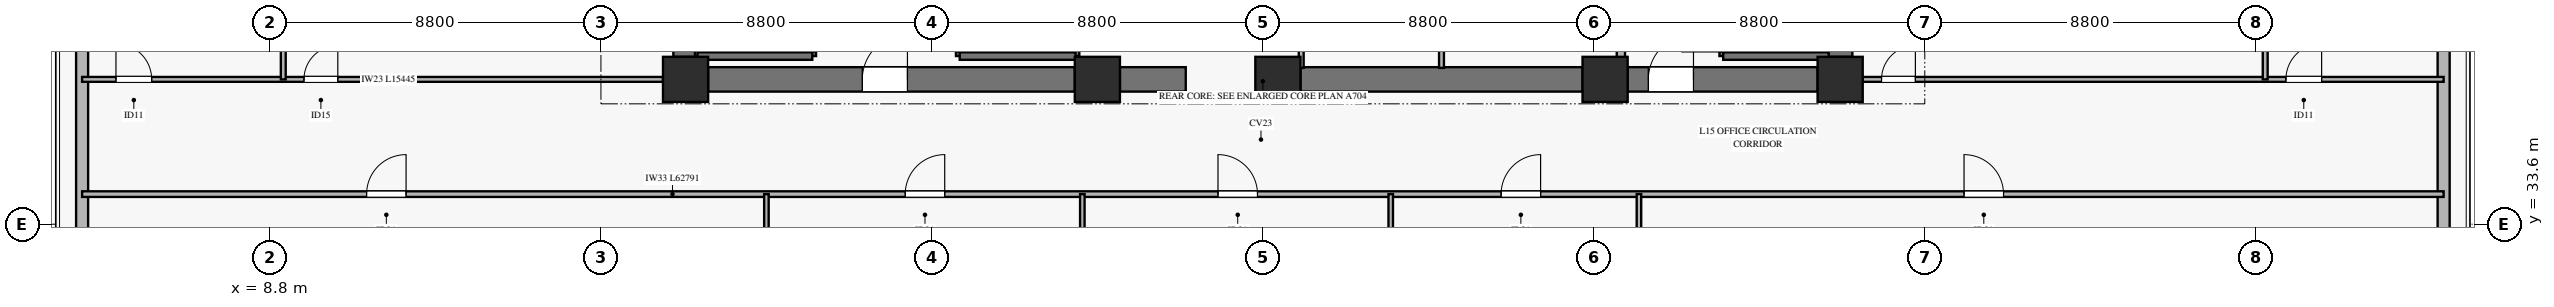
"""IFC4 building model, lengths in metres.
Left out: names, types, materials, properties, quantities, classifications, styles, units other than length and angle.
Written with IfcOpenShell. Run it as: python <this file> out.ifc"""

import sys

from ifc_helpers import new_model, si_unit, direction, frame, frame_2d, origin, origin_2d, place, context, subcontext, project, spatial, rectangle, extrude, source, transform, mapped, element, fill, save


model = new_model("IFC4")
c1 = context("Model", 3, precision=1e-05, world=origin(), true_north=direction((0.0, 1.0)))
c2 = subcontext(c1, "Body", "Model", "MODEL_VIEW")
j1 = project(units=[si_unit("LENGTHUNIT", "METRE"), si_unit("PLANEANGLEUNIT", "RADIAN")], contexts=[c1])
p1 = place(None, origin())
s1 = spatial("IfcSite", under=j1, at=p1, CompositionType="ELEMENT")
p2 = place(p1, origin())
s2 = spatial("IfcBuilding", under=s1, at=p2, CompositionType="ELEMENT")
p3 = place(p2, frame((0.0, 0.0, 61.1)))
s3 = spatial("IfcBuildingStorey", under=s2, at=p3, CompositionType="ELEMENT", Elevation=61.1)
m1 = source(origin(), c2, "Body", "SweptSolid", [
    extrude(rectangle(XDim=1.2, YDim=1.2, at=origin_2d()), origin(), (0.0, 0.0, 1.0), 3.68),
])
for number, where, z_axis, x_axis in (
    (1, (19.85, 37.45, 0.0), (0.0, 0.0, 1.0), (1.0, 0.0, 0.0)),
    (2, (30.8, 37.45, 0.0), (0.0, 0.0, 1.0), (1.0, 0.0, 0.0)),
    (3, (35.6, 37.45, 0.0), (0.0, 0.0, 1.0), (1.0, 0.0, 0.0)),
    (4, (44.3, 37.45, 0.0), (0.0, 0.0, 1.0), (1.0, 0.0, 0.0)),
    (5, (50.55, 37.45, 0.0), (0.0, 0.0, 1.0), (1.0, 0.0, 0.0)),
):
    element("IfcColumn", number, at=place(p3, frame(where, z_axis=z_axis, x_axis=x_axis)), inside=s3, PredefinedType="PILASTER", context=c2, shape_type="MappedRepresentation", body=[
        mapped(m1, transform((0.0, 0.0, 0.0), x_axis=(1.0, 0.0, 0.0), y_axis=(0.0, 1.0, 0.0), z_axis=(0.0, 0.0, 1.0), scale=1.0)),
    ])
p4 = place(p3, frame((20.45, 37.45, 0.0), z_axis=(0.0, 0.0, 1.0), x_axis=(1.0, 0.0, 0.0)))
e6 = element("IfcWall", 6, at=p4, inside=s3, PredefinedType="SHEAR", context=c2, shape_type="SweptSolid", body=[
    extrude(rectangle(XDim=9.75, YDim=0.65, at=frame_2d((4.875, 0.0))), origin(), (0.0, 0.0, 1.0), 3.68),
])
p5 = place(p4, frame((4.1, 0.0, 0.0)))
e7 = element("IfcOpeningElement", 7, at=p5, cuts=e6, PredefinedType="OPENING", context=c2, shape_type="SweptSolid", body=[
    extrude(rectangle(XDim=1.2, YDim=2.15, at=frame_2d((0.6, 1.075))), frame((0.0, 0.335, 0.0), z_axis=(0.0, -1.0, 0.0), x_axis=(1.0, 0.0, 0.0)), (0.0, 0.0, 1.0), 0.67),
])
p6 = place(p3, frame((31.4, 37.45, 0.0), z_axis=(0.0, 0.0, 1.0), x_axis=(1.0, 0.0, 0.0)))
e8 = element("IfcWall", 8, at=p6, inside=s3, PredefinedType="SHEAR", context=c2, shape_type="SweptSolid", body=[
    extrude(rectangle(XDim=1.75, YDim=0.65, at=frame_2d((0.875, 0.0))), origin(), (0.0, 0.0, 1.0), 3.68),
])
p7 = place(p3, frame((36.2, 37.45, 0.0), z_axis=(0.0, 0.0, 1.0), x_axis=(1.0, 0.0, 0.0)))
e9 = element("IfcWall", 9, at=p7, inside=s3, PredefinedType="SHEAR", context=c2, shape_type="SweptSolid", body=[
    extrude(rectangle(XDim=7.5, YDim=0.65, at=frame_2d((3.75, 0.0))), origin(), (0.0, 0.0, 1.0), 3.68),
])
p8 = place(p3, frame((44.9, 37.45, 0.0), z_axis=(0.0, 0.0, 1.0), x_axis=(1.0, 0.0, 0.0)))
e10 = element("IfcWall", 10, at=p8, inside=s3, PredefinedType="SHEAR", context=c2, shape_type="SweptSolid", body=[
    extrude(rectangle(XDim=5.05, YDim=0.65, at=frame_2d((2.525, 0.0))), origin(), (0.0, 0.0, 1.0), 3.68),
])
p9 = place(p8, frame((0.55, 0.0, 0.0)))
e11 = element("IfcOpeningElement", 11, at=p9, cuts=e10, PredefinedType="OPENING", context=c2, shape_type="SweptSolid", body=[
    extrude(rectangle(XDim=1.2, YDim=2.15, at=frame_2d((0.6, 1.075))), frame((0.0, 0.335, 0.0), z_axis=(0.0, -1.0, 0.0), x_axis=(1.0, 0.0, 0.0)), (0.0, 0.0, 1.0), 0.67),
])
for number, where, z_axis, x_axis in (
    (12, (19.85, 38.05, 0.0), (0.0, 0.0, 1.0), (0.0, 1.0, 0.0)),
    (13, (50.55, 38.05, 0.0), (0.0, 0.0, 1.0), (0.0, 1.0, 0.0)),
):
    element("IfcWall", number, at=place(p3, frame(where, z_axis=z_axis, x_axis=x_axis)), inside=s3, PredefinedType="SHEAR", context=c2, shape_type="SweptSolid", body=[
        extrude(rectangle(XDim=7.9, YDim=0.65, at=frame_2d((3.95, 0.0))), origin(), (0.0, 0.0, 1.0), 3.68),
    ])
p10 = place(p3, frame((3.805, 25.991, 0.0), z_axis=(0.0, 0.0, 1.0), x_axis=(0.0, 1.0, 0.0)))
e14 = element("IfcWall", 14, at=p10, inside=s3, PredefinedType="SOLIDWALL", context=c2, shape_type="SweptSolid", body=[
    extrude(rectangle(XDim=16.987, YDim=0.32, at=frame_2d((8.494, 0.0))), origin(), (0.0, 0.0, 1.0), 3.16),
])
p11 = place(p10, frame((4.223, 0.0, 0.45)))
e15 = element("IfcOpeningElement", 15, at=p11, cuts=e14, PredefinedType="OPENING", context=c2, shape_type="SweptSolid", body=[
    extrude(rectangle(XDim=2.4, YDim=2.1, at=frame_2d((1.2, 1.05))), frame((0.0, 0.17, 0.0), z_axis=(0.0, -1.0, 0.0), x_axis=(1.0, 0.0, 0.0)), (0.0, 0.0, 1.0), 0.34),
])
p12 = place(p3, frame((66.596, 25.991, 0.0), z_axis=(0.0, 0.0, 1.0), x_axis=(0.0, 1.0, 0.0)))
e16 = element("IfcWall", 16, at=p12, inside=s3, PredefinedType="SOLIDWALL", context=c2, shape_type="SweptSolid", body=[
    extrude(rectangle(XDim=16.987, YDim=0.32, at=frame_2d((8.494, 0.0))), origin(), (0.0, 0.0, 1.0), 3.16),
])
p13 = place(p12, frame((4.223, 0.0, 0.45)))
e17 = element("IfcOpeningElement", 17, at=p13, cuts=e16, PredefinedType="OPENING", context=c2, shape_type="SweptSolid", body=[
    extrude(rectangle(XDim=2.4, YDim=2.1, at=frame_2d((1.2, 1.05))), frame((0.0, 0.17, 0.0), z_axis=(0.0, -1.0, 0.0), x_axis=(1.0, 0.0, 0.0)), (0.0, 0.0, 1.0), 0.34),
])
p14 = place(p3, frame((20.17, 38.07, 0.0), z_axis=(0.0, 0.0, 1.0), x_axis=(0.0, 1.0, 0.0)))
e18 = element("IfcWall", 18, at=p14, inside=s3, PredefinedType="SOLIDWALL", context=c2, shape_type="SweptSolid", body=[
    extrude(rectangle(XDim=7.25, YDim=0.14, at=frame_2d((3.625, 0.0))), origin(), (0.0, 0.0, 1.0), 3.9),
])
p15 = place(p3, frame((23.22, 38.07, 0.0), z_axis=(0.0, 0.0, 1.0), x_axis=(0.0, 1.0, 0.0)))
e19 = element("IfcWall", 19, at=p15, inside=s3, PredefinedType="SOLIDWALL", context=c2, shape_type="SweptSolid", body=[
    extrude(rectangle(XDim=7.25, YDim=0.2, at=frame_2d((3.625, 0.0))), origin(), (0.0, 0.0, 1.0), 3.9),
])
p16 = place(p15, frame((0.11, 0.0, 0.0)))
e20 = element("IfcOpeningElement", 20, at=p16, cuts=e19, PredefinedType="OPENING", context=c2, shape_type="SweptSolid", body=[
    extrude(rectangle(XDim=1.1, YDim=2.15, at=frame_2d((0.55, 1.075))), frame((0.0, 0.11, 0.0), z_axis=(0.0, -1.0, 0.0), x_axis=(1.0, 0.0, 0.0)), (0.0, 0.0, 1.0), 0.22),
])
p17 = place(p3, frame((20.17, 38.07, 0.0), z_axis=(0.0, 0.0, 1.0), x_axis=(1.0, 0.0, 0.0)))
e21 = element("IfcWall", 21, at=p17, inside=s3, PredefinedType="SOLIDWALL", context=c2, shape_type="SweptSolid", body=[
    extrude(rectangle(XDim=3.05, YDim=0.2, at=frame_2d((1.525, 0.0))), origin(), (0.0, 0.0, 1.0), 3.9),
])
p18 = place(p3, frame((27.14, 38.07, 0.0), z_axis=(0.0, 0.0, 1.0), x_axis=(0.0, 1.0, 0.0)))
e22 = element("IfcWall", 22, at=p18, inside=s3, PredefinedType="SOLIDWALL", context=c2, shape_type="SweptSolid", body=[
    extrude(rectangle(XDim=7.25, YDim=0.2, at=frame_2d((3.625, 0.0))), origin(), (0.0, 0.0, 1.0), 3.9),
])
p19 = place(p18, frame((0.11, 0.0, 0.0)))
e23 = element("IfcOpeningElement", 23, at=p19, cuts=e22, PredefinedType="OPENING", context=c2, shape_type="SweptSolid", body=[
    extrude(rectangle(XDim=1.1, YDim=2.15, at=frame_2d((0.55, 1.075))), frame((0.0, 0.11, 0.0), z_axis=(0.0, -1.0, 0.0), x_axis=(1.0, 0.0, 0.0)), (0.0, 0.0, 1.0), 0.22),
])
p20 = place(p3, frame((30.22, 38.07, 0.0), z_axis=(0.0, 0.0, 1.0), x_axis=(0.0, 1.0, 0.0)))
e24 = element("IfcWall", 24, at=p20, inside=s3, PredefinedType="SOLIDWALL", context=c2, shape_type="SweptSolid", body=[
    extrude(rectangle(XDim=7.25, YDim=0.2, at=frame_2d((3.625, 0.0))), origin(), (0.0, 0.0, 1.0), 3.9),
])
p21 = place(p3, frame((27.14, 38.07, 0.0), z_axis=(0.0, 0.0, 1.0), x_axis=(1.0, 0.0, 0.0)))
e25 = element("IfcWall", 25, at=p21, inside=s3, PredefinedType="SOLIDWALL", context=c2, shape_type="SweptSolid", body=[
    extrude(rectangle(XDim=3.08, YDim=0.2, at=frame_2d((1.54, 0.0))), origin(), (0.0, 0.0, 1.0), 3.9),
])
p22 = place(p3, frame((47.44, 38.07, 0.0), z_axis=(0.0, 0.0, 1.0), x_axis=(0.0, 1.0, 0.0)))
e26 = element("IfcWall", 26, at=p22, inside=s3, PredefinedType="SOLIDWALL", context=c2, shape_type="SweptSolid", body=[
    extrude(rectangle(XDim=7.25, YDim=0.2, at=frame_2d((3.625, 0.0))), origin(), (0.0, 0.0, 1.0), 3.9),
])
p23 = place(p22, frame((0.11, 0.0, 0.0)))
e27 = element("IfcOpeningElement", 27, at=p23, cuts=e26, PredefinedType="OPENING", context=c2, shape_type="SweptSolid", body=[
    extrude(rectangle(XDim=1.1, YDim=2.15, at=frame_2d((0.55, 1.075))), frame((0.0, 0.11, 0.0), z_axis=(0.0, -1.0, 0.0), x_axis=(1.0, 0.0, 0.0)), (0.0, 0.0, 1.0), 0.22),
])
p24 = place(p3, frame((47.44, 38.07, 0.0), z_axis=(0.0, 0.0, 1.0), x_axis=(1.0, 0.0, 0.0)))
e28 = element("IfcWall", 28, at=p24, inside=s3, PredefinedType="SOLIDWALL", context=c2, shape_type="SweptSolid", body=[
    extrude(rectangle(XDim=2.805, YDim=0.2, at=frame_2d((1.403, 0.0))), origin(), (0.0, 0.0, 1.0), 3.9),
])
p25 = place(p3, frame((44.72, 37.755, 0.0), z_axis=(0.0, 0.0, 1.0), x_axis=(0.0, 1.0, 0.0)))
e29 = element("IfcWall", 29, at=p25, inside=s3, PredefinedType="SOLIDWALL", context=c2, shape_type="SweptSolid", body=[
    extrude(rectangle(XDim=7.465, YDim=0.22, at=frame_2d((3.732, 0.0))), origin(), (0.0, 0.0, 1.0), 3.68),
])
p26 = place(p3, frame((36.22, 37.755, 0.0), z_axis=(0.0, 0.0, 1.0), x_axis=(0.0, 1.0, 0.0)))
e30 = element("IfcWall", 30, at=p26, inside=s3, PredefinedType="PARTITIONING", context=c2, shape_type="SweptSolid", body=[
    extrude(rectangle(XDim=2.165, YDim=0.13, at=frame_2d((1.083, 0.0))), origin(), (0.0, 0.0, 1.0), 3.68),
])
p27 = place(p26, frame((0.855, 0.0, 0.0)))
e31 = element("IfcOpeningElement", 31, at=p27, cuts=e30, PredefinedType="OPENING", context=c2, shape_type="SweptSolid", body=[
    extrude(rectangle(XDim=0.9, YDim=2.1, at=frame_2d((0.45, 1.05))), frame((0.0, 0.075, 0.0), z_axis=(0.0, -1.0, 0.0), x_axis=(1.0, 0.0, 0.0)), (0.0, 0.0, 1.0), 0.15),
])
p28 = place(p3, frame((39.95, 37.755, 0.0), z_axis=(0.0, 0.0, 1.0), x_axis=(0.0, 1.0, 0.0)))
e32 = element("IfcWall", 32, at=p28, inside=s3, PredefinedType="PARTITIONING", context=c2, shape_type="SweptSolid", body=[
    extrude(rectangle(XDim=2.165, YDim=0.13, at=frame_2d((1.083, 0.0))), origin(), (0.0, 0.0, 1.0), 3.68),
])
p29 = place(p28, frame((0.565, 0.0, 0.0)))
e33 = element("IfcOpeningElement", 33, at=p29, cuts=e32, PredefinedType="OPENING", context=c2, shape_type="SweptSolid", body=[
    extrude(rectangle(XDim=0.9, YDim=2.1, at=frame_2d((0.45, 1.05))), frame((0.0, 0.075, 0.0), z_axis=(0.0, -1.0, 0.0), x_axis=(1.0, 0.0, 0.0)), (0.0, 0.0, 1.0), 0.15),
])
p30 = place(p3, frame((3.805, 34.4, 0.0), z_axis=(0.0, 0.0, 1.0), x_axis=(1.0, 0.0, 0.0)))
e34 = element("IfcWall", 34, at=p30, inside=s3, PredefinedType="PARTITIONING", context=c2, shape_type="SweptSolid", body=[
    extrude(rectangle(XDim=62.791, YDim=0.15, at=frame_2d((31.396, 0.0))), origin(), (0.0, 0.0, 1.0), 2.765),
])
p31 = place(p30, frame((7.564, 0.0, 0.0)))
e35 = element("IfcOpeningElement", 35, at=p31, cuts=e34, PredefinedType="OPENING", context=c2, shape_type="SweptSolid", body=[
    extrude(rectangle(XDim=1.05, YDim=2.15, at=frame_2d((0.525, 1.075))), frame((0.0, 0.085, 0.0), z_axis=(0.0, -1.0, 0.0), x_axis=(1.0, 0.0, 0.0)), (0.0, 0.0, 1.0), 0.17),
])
p32 = place(p30, frame((21.886, 0.0, 0.0)))
e36 = element("IfcOpeningElement", 36, at=p32, cuts=e34, PredefinedType="OPENING", context=c2, shape_type="SweptSolid", body=[
    extrude(rectangle(XDim=1.05, YDim=2.15, at=frame_2d((0.525, 1.075))), frame((0.0, 0.085, 0.0), z_axis=(0.0, -1.0, 0.0), x_axis=(1.0, 0.0, 0.0)), (0.0, 0.0, 1.0), 0.17),
])
p33 = place(p30, frame((30.202, 0.0, 0.0)))
e37 = element("IfcOpeningElement", 37, at=p33, cuts=e34, PredefinedType="OPENING", context=c2, shape_type="SweptSolid", body=[
    extrude(rectangle(XDim=1.05, YDim=2.15, at=frame_2d((0.525, 1.075))), frame((0.0, 0.085, 0.0), z_axis=(0.0, -1.0, 0.0), x_axis=(1.0, 0.0, 0.0)), (0.0, 0.0, 1.0), 0.17),
])
p34 = place(p30, frame((37.73, 0.0, 0.0)))
e38 = element("IfcOpeningElement", 38, at=p34, cuts=e34, PredefinedType="OPENING", context=c2, shape_type="SweptSolid", body=[
    extrude(rectangle(XDim=1.05, YDim=2.15, at=frame_2d((0.525, 1.075))), frame((0.0, 0.085, 0.0), z_axis=(0.0, -1.0, 0.0), x_axis=(1.0, 0.0, 0.0)), (0.0, 0.0, 1.0), 0.17),
])
p35 = place(p30, frame((50.039, 0.0, 0.0)))
e39 = element("IfcOpeningElement", 39, at=p35, cuts=e34, PredefinedType="OPENING", context=c2, shape_type="SweptSolid", body=[
    extrude(rectangle(XDim=1.05, YDim=2.15, at=frame_2d((0.525, 1.075))), frame((0.0, 0.085, 0.0), z_axis=(0.0, -1.0, 0.0), x_axis=(1.0, 0.0, 0.0)), (0.0, 0.0, 1.0), 0.17),
])
p36 = place(p3, frame((22.0, 4.882, 0.0), z_axis=(0.0, 0.0, 1.0), x_axis=(0.0, 1.0, 0.0)))
e40 = element("IfcWall", 40, at=p36, inside=s3, PredefinedType="PARTITIONING", context=c2, shape_type="SweptSolid", body=[
    extrude(rectangle(XDim=29.518, YDim=0.12, at=frame_2d((14.759, 0.0))), origin(), (0.0, 0.0, 1.0), 3.165),
])
p37 = place(p3, frame((30.4, 4.882, 0.0), z_axis=(0.0, 0.0, 1.0), x_axis=(0.0, 1.0, 0.0)))
e41 = element("IfcWall", 41, at=p37, inside=s3, PredefinedType="PARTITIONING", context=c2, shape_type="SweptSolid", body=[
    extrude(rectangle(XDim=29.518, YDim=0.12, at=frame_2d((14.759, 0.0))), origin(), (0.0, 0.0, 1.0), 3.215),
])
for number, where, z_axis, x_axis in (
    (42, (38.6, 4.882, 0.0), (0.0, 0.0, 1.0), (0.0, 1.0, 0.0)),
    (43, (45.2, 4.882, 0.0), (0.0, 0.0, 1.0), (0.0, 1.0, 0.0)),
):
    element("IfcWall", number, at=place(p3, frame(where, z_axis=z_axis, x_axis=x_axis)), inside=s3, PredefinedType="PARTITIONING", context=c2, shape_type="SweptSolid", body=[
        extrude(rectangle(XDim=29.518, YDim=0.12, at=frame_2d((14.759, 0.0))), origin(), (0.0, 0.0, 1.0), 3.165),
    ])
p38 = place(p3, frame((3.805, 37.45, 0.0), z_axis=(0.0, 0.0, 1.0), x_axis=(1.0, 0.0, 0.0)))
e44 = element("IfcWall", 44, at=p38, inside=s3, PredefinedType="PARTITIONING", context=c2, shape_type="SweptSolid", body=[
    extrude(rectangle(XDim=15.445, YDim=0.13, at=frame_2d((7.723, 0.0))), origin(), (0.0, 0.0, 1.0), 3.165),
])
p39 = place(p38, frame((0.9, 0.0, 0.0)))
e45 = element("IfcOpeningElement", 45, at=p39, cuts=e44, PredefinedType="OPENING", context=c2, shape_type="SweptSolid", body=[
    extrude(rectangle(XDim=0.95, YDim=2.1, at=frame_2d((0.475, 1.05))), frame((0.0, 0.075, 0.0), z_axis=(0.0, -1.0, 0.0), x_axis=(1.0, 0.0, 0.0)), (0.0, 0.0, 1.0), 0.15),
])
p40 = place(p38, frame((5.899, 0.0, 0.0)))
e46 = element("IfcOpeningElement", 46, at=p40, cuts=e44, PredefinedType="OPENING", context=c2, shape_type="SweptSolid", body=[
    extrude(rectangle(XDim=0.9, YDim=2.1, at=frame_2d((0.45, 1.05))), frame((0.0, 0.075, 0.0), z_axis=(0.0, -1.0, 0.0), x_axis=(1.0, 0.0, 0.0)), (0.0, 0.0, 1.0), 0.15),
])
p41 = place(p3, frame((9.154, 37.45, 0.0), z_axis=(0.0, 0.0, 1.0), x_axis=(0.0, 1.0, 0.0)))
e47 = element("IfcWall", 47, at=p41, inside=s3, PredefinedType="PARTITIONING", context=c2, shape_type="SweptSolid", body=[
    extrude(rectangle(XDim=8.8, YDim=0.13, at=frame_2d((4.4, 0.0))), origin(), (0.0, 0.0, 1.0), 3.68),
])
p42 = place(p3, frame((51.15, 37.45, 0.0), z_axis=(0.0, 0.0, 1.0), x_axis=(1.0, 0.0, 0.0)))
e48 = element("IfcWall", 48, at=p42, inside=s3, PredefinedType="PARTITIONING", context=c2, shape_type="SweptSolid", body=[
    extrude(rectangle(XDim=15.446, YDim=0.13, at=frame_2d((7.723, 0.0))), origin(), (0.0, 0.0, 1.0), 3.165),
])
p43 = place(p42, frame((0.5, 0.0, 0.0)))
e49 = element("IfcOpeningElement", 49, at=p43, cuts=e48, PredefinedType="OPENING", context=c2, shape_type="SweptSolid", body=[
    extrude(rectangle(XDim=0.9, YDim=2.1, at=frame_2d((0.45, 1.05))), frame((0.0, 0.075, 0.0), z_axis=(0.0, -1.0, 0.0), x_axis=(1.0, 0.0, 0.0)), (0.0, 0.0, 1.0), 0.15),
])
p44 = place(p42, frame((11.252, 0.0, 0.0)))
e50 = element("IfcOpeningElement", 50, at=p44, cuts=e48, PredefinedType="OPENING", context=c2, shape_type="SweptSolid", body=[
    extrude(rectangle(XDim=0.95, YDim=2.1, at=frame_2d((0.475, 1.05))), frame((0.0, 0.075, 0.0), z_axis=(0.0, -1.0, 0.0), x_axis=(1.0, 0.0, 0.0)), (0.0, 0.0, 1.0), 0.15),
])
p45 = place(p3, frame((61.852, 37.45, 0.0), z_axis=(0.0, 0.0, 1.0), x_axis=(0.0, 1.0, 0.0)))
e51 = element("IfcWall", 51, at=p45, inside=s3, PredefinedType="PARTITIONING", context=c2, shape_type="SweptSolid", body=[
    extrude(rectangle(XDim=8.8, YDim=0.13, at=frame_2d((4.4, 0.0))), origin(), (0.0, 0.0, 1.0), 3.68),
])
m2 = source(origin(), c2, "Body", "SweptSolid", [
    extrude(rectangle(XDim=1.2, YDim=2.15, at=frame_2d((0.6, 1.075))), frame((0.0, 0.025, 0.0), z_axis=(0.0, -1.0, 0.0), x_axis=(1.0, 0.0, 0.0)), (0.0, 0.0, 1.0), 0.05),
])
p46 = place(p5, origin())
e52 = element("IfcDoor", 52, at=p46, inside=s3, OperationType="SINGLE_SWING_RIGHT", PredefinedType="DOOR", context=c2, shape_type="MappedRepresentation", body=[
    mapped(m2, transform((0.0, 0.0, 0.0), x_axis=(1.0, 0.0, 0.0), y_axis=(0.0, 1.0, 0.0), z_axis=(0.0, 0.0, 1.0), scale=1.0)),
])
fill(e7, e52)
p47 = place(p9, origin())
e53 = element("IfcDoor", 53, at=p47, inside=s3, OperationType="SINGLE_SWING_RIGHT", PredefinedType="DOOR", context=c2, shape_type="MappedRepresentation", body=[
    mapped(m2, transform((0.0, 0.0, 0.0), x_axis=(1.0, 0.0, 0.0), y_axis=(0.0, 1.0, 0.0), z_axis=(0.0, 0.0, 1.0), scale=1.0)),
])
fill(e11, e53)
m3 = source(origin(), c2, "Body", "SweptSolid", [
    extrude(rectangle(XDim=1.05, YDim=2.15, at=frame_2d((0.525, 1.075))), frame((0.0, 0.025, 0.0), z_axis=(0.0, -1.0, 0.0), x_axis=(1.0, 0.0, 0.0)), (0.0, 0.0, 1.0), 0.05),
])
p48 = place(p31, origin())
e54 = element("IfcDoor", 54, at=p48, inside=s3, OperationType="SINGLE_SWING_RIGHT", PredefinedType="DOOR", context=c2, shape_type="MappedRepresentation", body=[
    mapped(m3, transform((0.0, 0.0, 0.0), x_axis=(1.0, 0.0, 0.0), y_axis=(0.0, 1.0, 0.0), z_axis=(0.0, 0.0, 1.0), scale=1.0)),
])
fill(e35, e54)
p49 = place(p32, origin())
e55 = element("IfcDoor", 55, at=p49, inside=s3, OperationType="SINGLE_SWING_RIGHT", PredefinedType="DOOR", context=c2, shape_type="MappedRepresentation", body=[
    mapped(m3, transform((0.0, 0.0, 0.0), x_axis=(1.0, 0.0, 0.0), y_axis=(0.0, 1.0, 0.0), z_axis=(0.0, 0.0, 1.0), scale=1.0)),
])
fill(e36, e55)
p50 = place(p33, origin())
e56 = element("IfcDoor", 56, at=p50, inside=s3, OperationType="SINGLE_SWING_LEFT", PredefinedType="DOOR", context=c2, shape_type="MappedRepresentation", body=[
    mapped(m3, transform((0.0, 0.0, 0.0), x_axis=(1.0, 0.0, 0.0), y_axis=(0.0, 1.0, 0.0), z_axis=(0.0, 0.0, 1.0), scale=1.0)),
])
fill(e37, e56)
p51 = place(p34, origin())
e57 = element("IfcDoor", 57, at=p51, inside=s3, OperationType="SINGLE_SWING_RIGHT", PredefinedType="DOOR", context=c2, shape_type="MappedRepresentation", body=[
    mapped(m3, transform((0.0, 0.0, 0.0), x_axis=(1.0, 0.0, 0.0), y_axis=(0.0, 1.0, 0.0), z_axis=(0.0, 0.0, 1.0), scale=1.0)),
])
fill(e38, e57)
p52 = place(p35, origin())
e58 = element("IfcDoor", 58, at=p52, inside=s3, OperationType="SINGLE_SWING_LEFT", PredefinedType="DOOR", context=c2, shape_type="MappedRepresentation", body=[
    mapped(m3, transform((0.0, 0.0, 0.0), x_axis=(1.0, 0.0, 0.0), y_axis=(0.0, 1.0, 0.0), z_axis=(0.0, 0.0, 1.0), scale=1.0)),
])
fill(e39, e58)
m4 = source(origin(), c2, "Body", "SweptSolid", [
    extrude(rectangle(XDim=0.95, YDim=2.1, at=frame_2d((0.475, 1.05))), frame((0.0, 0.025, 0.0), z_axis=(0.0, -1.0, 0.0), x_axis=(1.0, 0.0, 0.0)), (0.0, 0.0, 1.0), 0.05),
])
p53 = place(p39, origin())
e59 = element("IfcDoor", 59, at=p53, inside=s3, OperationType="SINGLE_SWING_LEFT", PredefinedType="DOOR", context=c2, shape_type="MappedRepresentation", body=[
    mapped(m4, transform((0.0, 0.0, 0.0), x_axis=(1.0, 0.0, 0.0), y_axis=(0.0, 1.0, 0.0), z_axis=(0.0, 0.0, 1.0), scale=1.0)),
])
fill(e45, e59)
m5 = source(origin(), c2, "Body", "SweptSolid", [
    extrude(rectangle(XDim=0.9, YDim=2.1, at=frame_2d((0.45, 1.05))), frame((0.0, 0.025, 0.0), z_axis=(0.0, -1.0, 0.0), x_axis=(1.0, 0.0, 0.0)), (0.0, 0.0, 1.0), 0.05),
])
p54 = place(p40, origin())
e60 = element("IfcDoor", 60, at=p54, inside=s3, OperationType="SINGLE_SWING_RIGHT", PredefinedType="DOOR", context=c2, shape_type="MappedRepresentation", body=[
    mapped(m5, transform((0.0, 0.0, 0.0), x_axis=(1.0, 0.0, 0.0), y_axis=(0.0, 1.0, 0.0), z_axis=(0.0, 0.0, 1.0), scale=1.0)),
])
fill(e46, e60)
p55 = place(p43, origin())
e61 = element("IfcDoor", 61, at=p55, inside=s3, OperationType="SINGLE_SWING_RIGHT", PredefinedType="DOOR", context=c2, shape_type="MappedRepresentation", body=[
    mapped(m5, transform((0.0, 0.0, 0.0), x_axis=(1.0, 0.0, 0.0), y_axis=(0.0, 1.0, 0.0), z_axis=(0.0, 0.0, 1.0), scale=1.0)),
])
fill(e49, e61)
p56 = place(p44, origin())
e62 = element("IfcDoor", 62, at=p56, inside=s3, OperationType="SINGLE_SWING_RIGHT", PredefinedType="DOOR", context=c2, shape_type="MappedRepresentation", body=[
    mapped(m4, transform((0.0, 0.0, 0.0), x_axis=(1.0, 0.0, 0.0), y_axis=(0.0, 1.0, 0.0), z_axis=(0.0, 0.0, 1.0), scale=1.0)),
])
fill(e50, e62)
save(model, sys.argv[1])
